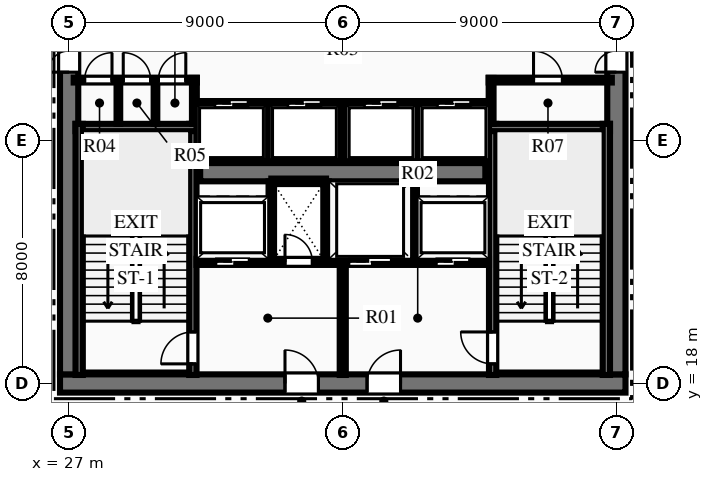
"""IFC4 building model, lengths in metres.
Left out: names, types, materials, properties, quantities, classifications, styles, units other than length and angle.
Written with IfcOpenShell. Run it as: python <this file> out.ifc"""

import sys

from ifc_helpers import new_model, si_unit, direction, frame, frame_2d, origin, place, context, subcontext, project, spatial, rectangle, extrude, element, fill, save


model = new_model("IFC4")
c1 = context("Model", 3, precision=1e-05, world=origin(), true_north=direction((0.0, 1.0)))
c2 = subcontext(c1, "Body", "Model", "MODEL_VIEW")
j1 = project(units=[si_unit("LENGTHUNIT", "METRE"), si_unit("PLANEANGLEUNIT", "RADIAN")], contexts=[c1])
p1 = place(None, origin())
s1 = spatial("IfcSite", under=j1, at=p1, CompositionType="ELEMENT")
p2 = place(p1, origin())
s2 = spatial("IfcBuilding", under=s1, at=p2, CompositionType="ELEMENT")
p3 = place(p2, frame((0.0, 0.0, 73.95)))
s3 = spatial("IfcBuildingStorey", under=s2, at=p3, CompositionType="ELEMENT", Elevation=73.95)
p4 = place(p3, frame((26.7, 18.0, 0.0), z_axis=(0.0, 0.0, 1.0), x_axis=(1.0, 0.0, 0.0)))
e1 = element("IfcWall", 1, at=p4, inside=s3, PredefinedType="SHEAR", context=c2, shape_type="SweptSolid", body=[
    extrude(rectangle(XDim=18.6, YDim=0.6, at=frame_2d((9.3, 0.0))), origin(), (0.0, 0.0, 1.0), 3.75),
])
p5 = place(p4, frame((7.4, 0.0, 0.0)))
e2 = element("IfcOpeningElement", 2, at=p5, cuts=e1, PredefinedType="OPENING", context=c2, shape_type="SweptSolid", body=[
    extrude(rectangle(XDim=1.1, YDim=2.15, at=frame_2d((0.55, 1.075))), frame((0.0, 0.31, 0.0), z_axis=(0.0, -1.0, 0.0), x_axis=(1.0, 0.0, 0.0)), (0.0, 0.0, 1.0), 0.62),
])
p6 = place(p4, frame((10.1, 0.0, 0.0)))
e3 = element("IfcOpeningElement", 3, at=p6, cuts=e1, PredefinedType="OPENING", context=c2, shape_type="SweptSolid", body=[
    extrude(rectangle(XDim=1.1, YDim=2.15, at=frame_2d((0.55, 1.075))), frame((0.0, 0.31, 0.0), z_axis=(0.0, -1.0, 0.0), x_axis=(1.0, 0.0, 0.0)), (0.0, 0.0, 1.0), 0.62),
])
p7 = place(p3, frame((27.0, 18.3, 0.0), z_axis=(0.0, 0.0, 1.0), x_axis=(0.0, 1.0, 0.0)))
e4 = element("IfcWall", 4, at=p7, inside=s3, PredefinedType="SHEAR", context=c2, shape_type="SweptSolid", body=[
    extrude(rectangle(XDim=15.4, YDim=0.6, at=frame_2d((7.7, 0.0))), origin(), (0.0, 0.0, 1.0), 3.75),
])
p8 = place(p7, frame((9.94, 0.0, 0.0)))
e5 = element("IfcOpeningElement", 5, at=p8, cuts=e4, PredefinedType="OPENING", context=c2, shape_type="SweptSolid", body=[
    extrude(rectangle(XDim=1.4, YDim=2.2, at=frame_2d((0.7, 1.1))), frame((0.0, 0.31, 0.0), z_axis=(0.0, -1.0, 0.0), x_axis=(1.0, 0.0, 0.0)), (0.0, 0.0, 1.0), 0.62),
])
p9 = place(p3, frame((45.0, 18.3, 0.0), z_axis=(0.0, 0.0, 1.0), x_axis=(0.0, 1.0, 0.0)))
e6 = element("IfcWall", 6, at=p9, inside=s3, PredefinedType="SHEAR", context=c2, shape_type="SweptSolid", body=[
    extrude(rectangle(XDim=15.4, YDim=0.6, at=frame_2d((7.7, 0.0))), origin(), (0.0, 0.0, 1.0), 3.75),
])
p10 = place(p9, frame((9.94, 0.0, 0.0)))
e7 = element("IfcOpeningElement", 7, at=p10, cuts=e6, PredefinedType="OPENING", context=c2, shape_type="SweptSolid", body=[
    extrude(rectangle(XDim=1.4, YDim=2.2, at=frame_2d((0.7, 1.1))), frame((0.0, 0.31, 0.0), z_axis=(0.0, -1.0, 0.0), x_axis=(1.0, 0.0, 0.0)), (0.0, 0.0, 1.0), 0.62),
])
p11 = place(p3, frame((31.31, 24.95, 0.0), z_axis=(0.0, 0.0, 1.0), x_axis=(1.0, 0.0, 0.0)))
e8 = element("IfcWall", 8, at=p11, inside=s3, PredefinedType="SHEAR", context=c2, shape_type="SweptSolid", body=[
    extrude(rectangle(XDim=9.38, YDim=0.6, at=frame_2d((4.69, 0.0))), origin(), (0.0, 0.0, 1.0), 3.75),
])
p12 = place(p3, frame((31.07, 18.28, 0.0), z_axis=(0.0, 0.0, 1.0), x_axis=(0.0, 1.0, 0.0)))
e9 = element("IfcWall", 9, at=p12, inside=s3, PredefinedType="SHEAR", context=c2, shape_type="SweptSolid", body=[
    extrude(rectangle(XDim=8.26, YDim=0.24, at=frame_2d((4.13, 0.0))), origin(), (0.0, 0.0, 1.0), 3.75),
])
p13 = place(p12, frame((0.365, 0.0, 0.0)))
e10 = element("IfcOpeningElement", 10, at=p13, cuts=e9, PredefinedType="OPENING", context=c2, shape_type="SweptSolid", body=[
    extrude(rectangle(XDim=1.05, YDim=2.15, at=frame_2d((0.525, 1.075))), frame((0.0, 0.13, 0.0), z_axis=(0.0, -1.0, 0.0), x_axis=(1.0, 0.0, 0.0)), (0.0, 0.0, 1.0), 0.26),
])
p14 = place(p3, frame((27.21, 26.42, 0.0), z_axis=(0.0, 0.0, 1.0), x_axis=(1.0, 0.0, 0.0)))
e11 = element("IfcWall", 11, at=p14, inside=s3, PredefinedType="SHEAR", context=c2, shape_type="SweptSolid", body=[
    extrude(rectangle(XDim=3.98, YDim=0.24, at=frame_2d((1.99, 0.0))), origin(), (0.0, 0.0, 1.0), 3.75),
])
p15 = place(p3, frame((27.33, 18.28, 0.0), z_axis=(0.0, 0.0, 1.0), x_axis=(0.0, 1.0, 0.0)))
e12 = element("IfcWall", 12, at=p15, inside=s3, PredefinedType="SHEAR", context=c2, shape_type="SweptSolid", body=[
    extrude(rectangle(XDim=8.26, YDim=0.24, at=frame_2d((4.13, 0.0))), origin(), (0.0, 0.0, 1.0), 3.75),
])
p16 = place(p3, frame((40.93, 18.28, 0.0), z_axis=(0.0, 0.0, 1.0), x_axis=(0.0, 1.0, 0.0)))
e13 = element("IfcWall", 13, at=p16, inside=s3, PredefinedType="SHEAR", context=c2, shape_type="SweptSolid", body=[
    extrude(rectangle(XDim=8.26, YDim=0.24, at=frame_2d((4.13, 0.0))), origin(), (0.0, 0.0, 1.0), 3.75),
])
p17 = place(p16, frame((0.365, 0.0, 0.0)))
e14 = element("IfcOpeningElement", 14, at=p17, cuts=e13, PredefinedType="OPENING", context=c2, shape_type="SweptSolid", body=[
    extrude(rectangle(XDim=1.05, YDim=2.15, at=frame_2d((0.525, 1.075))), frame((0.0, 0.13, 0.0), z_axis=(0.0, -1.0, 0.0), x_axis=(1.0, 0.0, 0.0)), (0.0, 0.0, 1.0), 0.26),
])
p18 = place(p3, frame((40.81, 26.42, 0.0), z_axis=(0.0, 0.0, 1.0), x_axis=(1.0, 0.0, 0.0)))
e15 = element("IfcWall", 15, at=p18, inside=s3, PredefinedType="SHEAR", context=c2, shape_type="SweptSolid", body=[
    extrude(rectangle(XDim=3.98, YDim=0.24, at=frame_2d((1.99, 0.0))), origin(), (0.0, 0.0, 1.0), 3.75),
])
p19 = place(p3, frame((44.67, 18.28, 0.0), z_axis=(0.0, 0.0, 1.0), x_axis=(0.0, 1.0, 0.0)))
e16 = element("IfcWall", 16, at=p19, inside=s3, PredefinedType="SHEAR", context=c2, shape_type="SweptSolid", body=[
    extrude(rectangle(XDim=8.26, YDim=0.24, at=frame_2d((4.13, 0.0))), origin(), (0.0, 0.0, 1.0), 3.75),
])
p20 = place(p3, frame((36.0, 18.28, 0.0), z_axis=(0.0, 0.0, 1.0), x_axis=(0.0, 1.0, 0.0)))
e17 = element("IfcWall", 17, at=p20, inside=s3, PredefinedType="PARTITIONING", context=c2, shape_type="SweptSolid", body=[
    extrude(rectangle(XDim=3.77, YDim=0.2, at=frame_2d((1.885, 0.0))), origin(), (0.0, 0.0, 1.0), 3.44),
])
p21 = place(p3, frame((31.19, 22.0, 0.0), z_axis=(0.0, 0.0, 1.0), x_axis=(1.0, 0.0, 0.0)))
e18 = element("IfcWall", 18, at=p21, inside=s3, PredefinedType="PARTITIONING", context=c2, shape_type="SweptSolid", body=[
    extrude(rectangle(XDim=4.69, YDim=0.2, at=frame_2d((2.345, 0.0))), origin(), (0.0, 0.0, 1.0), 3.44),
])
p22 = place(p21, frame((2.91, 0.0, 0.0)))
e19 = element("IfcOpeningElement", 19, at=p22, cuts=e18, PredefinedType="OPENING", context=c2, shape_type="SweptSolid", body=[
    extrude(rectangle(XDim=0.9, YDim=2.15, at=frame_2d((0.45, 1.075))), frame((0.0, 0.11, 0.0), z_axis=(0.0, -1.0, 0.0), x_axis=(1.0, 0.0, 0.0)), (0.0, 0.0, 1.0), 0.22),
])
p23 = place(p21, frame((0.635, 0.0, 0.0)))
e20 = element("IfcOpeningElement", 20, at=p23, cuts=e18, PredefinedType="OPENING", context=c2, shape_type="SweptSolid", body=[
    extrude(rectangle(XDim=1.1, YDim=2.15, at=frame_2d((0.55, 1.075))), frame((0.0, 0.11, 0.0), z_axis=(0.0, -1.0, 0.0), x_axis=(1.0, 0.0, 0.0)), (0.0, 0.0, 1.0), 0.22),
])
p24 = place(p3, frame((36.12, 22.0, 0.0), z_axis=(0.0, 0.0, 1.0), x_axis=(1.0, 0.0, 0.0)))
e21 = element("IfcWall", 21, at=p24, inside=s3, PredefinedType="PARTITIONING", context=c2, shape_type="SweptSolid", body=[
    extrude(rectangle(XDim=4.69, YDim=0.2, at=frame_2d((2.345, 0.0))), origin(), (0.0, 0.0, 1.0), 3.44),
])
p25 = place(p24, frame((2.955, 0.0, 0.0)))
e22 = element("IfcOpeningElement", 22, at=p25, cuts=e21, PredefinedType="OPENING", context=c2, shape_type="SweptSolid", body=[
    extrude(rectangle(XDim=1.1, YDim=2.15, at=frame_2d((0.55, 1.075))), frame((0.0, 0.11, 0.0), z_axis=(0.0, -1.0, 0.0), x_axis=(1.0, 0.0, 0.0)), (0.0, 0.0, 1.0), 0.22),
])
p26 = place(p24, frame((0.08, 0.0, 0.0)))
e23 = element("IfcOpeningElement", 23, at=p26, cuts=e21, PredefinedType="OPENING", context=c2, shape_type="SweptSolid", body=[
    extrude(rectangle(XDim=1.4, YDim=2.2, at=frame_2d((0.7, 1.1))), frame((0.0, 0.11, 0.0), z_axis=(0.0, -1.0, 0.0), x_axis=(1.0, 0.0, 0.0)), (0.0, 0.0, 1.0), 0.22),
])
for number, where, z_axis, x_axis in (
    (24, (33.65, 22.05, 0.0), (0.0, 0.0, 1.0), (0.0, 1.0, 0.0)),
    (25, (35.45, 22.05, 0.0), (0.0, 0.0, 1.0), (0.0, 1.0, 0.0)),
):
    element("IfcWall", number, at=place(p3, frame(where, z_axis=z_axis, x_axis=x_axis)), inside=s3, PredefinedType="PARTITIONING", context=c2, shape_type="SweptSolid", body=[
        extrude(rectangle(XDim=2.6, YDim=0.18, at=frame_2d((1.3, 0.0))), origin(), (0.0, 0.0, 1.0), 3.44),
    ])
p27 = place(p3, frame((33.65, 24.65, 0.0), z_axis=(0.0, 0.0, 1.0), x_axis=(1.0, 0.0, 0.0)))
e26 = element("IfcWall", 26, at=p27, inside=s3, PredefinedType="PARTITIONING", context=c2, shape_type="SweptSolid", body=[
    extrude(rectangle(XDim=1.8, YDim=0.18, at=frame_2d((0.9, 0.0))), origin(), (0.0, 0.0, 1.0), 3.44),
])
p28 = place(p3, frame((38.35, 22.05, 0.0), z_axis=(0.0, 0.0, 1.0), x_axis=(0.0, 1.0, 0.0)))
e27 = element("IfcWall", 27, at=p28, inside=s3, PredefinedType="PARTITIONING", context=c2, shape_type="SweptSolid", body=[
    extrude(rectangle(XDim=2.6, YDim=0.18, at=frame_2d((1.3, 0.0))), origin(), (0.0, 0.0, 1.0), 3.44),
])
p29 = place(p3, frame((27.15, 27.98, 0.0), z_axis=(0.0, 0.0, 1.0), x_axis=(1.0, 0.0, 0.0)))
e28 = element("IfcWall", 28, at=p29, inside=s3, PredefinedType="PARTITIONING", context=c2, shape_type="SweptSolid", body=[
    extrude(rectangle(XDim=4.05, YDim=0.16, at=frame_2d((2.025, 0.0))), origin(), (0.0, 0.0, 1.0), 3.44),
])
p30 = place(p29, frame((0.36, 0.0, 0.0)))
e29 = element("IfcOpeningElement", 29, at=p30, cuts=e28, PredefinedType="OPENING", context=c2, shape_type="SweptSolid", body=[
    extrude(rectangle(XDim=0.9, YDim=2.15, at=frame_2d((0.45, 1.075))), frame((0.0, 0.09, 0.0), z_axis=(0.0, -1.0, 0.0), x_axis=(1.0, 0.0, 0.0)), (0.0, 0.0, 1.0), 0.18),
])
p31 = place(p29, frame((1.63, 0.0, 0.0)))
e30 = element("IfcOpeningElement", 30, at=p31, cuts=e28, PredefinedType="OPENING", context=c2, shape_type="SweptSolid", body=[
    extrude(rectangle(XDim=0.9, YDim=2.15, at=frame_2d((0.45, 1.075))), frame((0.0, 0.09, 0.0), z_axis=(0.0, -1.0, 0.0), x_axis=(1.0, 0.0, 0.0)), (0.0, 0.0, 1.0), 0.18),
])
p32 = place(p29, frame((2.788, 0.0, 0.0)))
e31 = element("IfcOpeningElement", 31, at=p32, cuts=e28, PredefinedType="OPENING", context=c2, shape_type="SweptSolid", body=[
    extrude(rectangle(XDim=0.9, YDim=2.15, at=frame_2d((0.45, 1.075))), frame((0.0, 0.09, 0.0), z_axis=(0.0, -1.0, 0.0), x_axis=(1.0, 0.0, 0.0)), (0.0, 0.0, 1.0), 0.18),
])
p33 = place(p3, frame((31.12, 26.54, 0.0), z_axis=(0.0, 0.0, 1.0), x_axis=(0.0, 1.0, 0.0)))
e32 = element("IfcWall", 32, at=p33, inside=s3, PredefinedType="PARTITIONING", context=c2, shape_type="SweptSolid", body=[
    extrude(rectangle(XDim=1.51, YDim=0.16, at=frame_2d((0.755, 0.0))), origin(), (0.0, 0.0, 1.0), 3.44),
])
p34 = place(p3, frame((40.8, 27.98, 0.0), z_axis=(0.0, 0.0, 1.0), x_axis=(1.0, 0.0, 0.0)))
e33 = element("IfcWall", 33, at=p34, inside=s3, PredefinedType="PARTITIONING", context=c2, shape_type="SweptSolid", body=[
    extrude(rectangle(XDim=4.05, YDim=0.16, at=frame_2d((2.025, 0.0))), origin(), (0.0, 0.0, 1.0), 3.44),
])
p35 = place(p34, frame((1.475, 0.0, 0.0)))
e34 = element("IfcOpeningElement", 34, at=p35, cuts=e33, PredefinedType="OPENING", context=c2, shape_type="SweptSolid", body=[
    extrude(rectangle(XDim=0.95, YDim=2.15, at=frame_2d((0.475, 1.075))), frame((0.0, 0.09, 0.0), z_axis=(0.0, -1.0, 0.0), x_axis=(1.0, 0.0, 0.0)), (0.0, 0.0, 1.0), 0.18),
])
p36 = place(p3, frame((40.88, 26.54, 0.0), z_axis=(0.0, 0.0, 1.0), x_axis=(0.0, 1.0, 0.0)))
e35 = element("IfcWall", 35, at=p36, inside=s3, PredefinedType="PARTITIONING", context=c2, shape_type="SweptSolid", body=[
    extrude(rectangle(XDim=1.51, YDim=0.16, at=frame_2d((0.755, 0.0))), origin(), (0.0, 0.0, 1.0), 3.44),
])
for number, where, z_axis, x_axis in (
    (36, (28.62, 26.54, 0.0), (0.0, 0.0, 1.0), (0.0, 1.0, 0.0)),
    (37, (29.84, 26.54, 0.0), (0.0, 0.0, 1.0), (0.0, 1.0, 0.0)),
):
    element("IfcWall", number, at=place(p3, frame(where, z_axis=z_axis, x_axis=x_axis)), inside=s3, PredefinedType="PARTITIONING", context=c2, shape_type="SweptSolid", body=[
        extrude(rectangle(XDim=1.44, YDim=0.12, at=frame_2d((0.72, 0.0))), origin(), (0.0, 0.0, 1.0), 3.44),
    ])
p37 = place(p3, frame((31.2, 27.2, 0.0), z_axis=(0.0, 0.0, 1.0), x_axis=(1.0, 0.0, 0.0)))
e38 = element("IfcWall", 38, at=p37, inside=s3, PredefinedType="PARTITIONING", context=c2, shape_type="SweptSolid", body=[
    extrude(rectangle(XDim=9.6, YDim=0.18, at=frame_2d((4.8, 0.0))), origin(), (0.0, 0.0, 1.0), 3.44),
])
p38 = place(p37, frame((0.59, 0.0, 0.0)))
e39 = element("IfcOpeningElement", 39, at=p38, cuts=e38, PredefinedType="OPENING", context=c2, shape_type="SweptSolid", body=[
    extrude(rectangle(XDim=1.1, YDim=2.15, at=frame_2d((0.55, 1.075))), frame((0.0, 0.1, 0.0), z_axis=(0.0, -1.0, 0.0), x_axis=(1.0, 0.0, 0.0)), (0.0, 0.0, 1.0), 0.2),
])
p39 = place(p37, frame((2.99, 0.0, 0.0)))
e40 = element("IfcOpeningElement", 40, at=p39, cuts=e38, PredefinedType="OPENING", context=c2, shape_type="SweptSolid", body=[
    extrude(rectangle(XDim=1.1, YDim=2.15, at=frame_2d((0.55, 1.075))), frame((0.0, 0.1, 0.0), z_axis=(0.0, -1.0, 0.0), x_axis=(1.0, 0.0, 0.0)), (0.0, 0.0, 1.0), 0.2),
])
p40 = place(p37, frame((5.51, 0.0, 0.0)))
e41 = element("IfcOpeningElement", 41, at=p40, cuts=e38, PredefinedType="OPENING", context=c2, shape_type="SweptSolid", body=[
    extrude(rectangle(XDim=1.1, YDim=2.15, at=frame_2d((0.55, 1.075))), frame((0.0, 0.1, 0.0), z_axis=(0.0, -1.0, 0.0), x_axis=(1.0, 0.0, 0.0)), (0.0, 0.0, 1.0), 0.2),
])
p41 = place(p37, frame((7.91, 0.0, 0.0)))
e42 = element("IfcOpeningElement", 42, at=p41, cuts=e38, PredefinedType="OPENING", context=c2, shape_type="SweptSolid", body=[
    extrude(rectangle(XDim=1.1, YDim=2.15, at=frame_2d((0.55, 1.075))), frame((0.0, 0.1, 0.0), z_axis=(0.0, -1.0, 0.0), x_axis=(1.0, 0.0, 0.0)), (0.0, 0.0, 1.0), 0.2),
])
for number, where, z_axis, x_axis in (
    (43, (33.54, 25.3, 0.0), (0.0, 0.0, 1.0), (0.0, 1.0, 0.0)),
    (44, (36.0, 25.3, 0.0), (0.0, 0.0, 1.0), (0.0, 1.0, 0.0)),
    (45, (38.46, 25.3, 0.0), (0.0, 0.0, 1.0), (0.0, 1.0, 0.0)),
):
    element("IfcWall", number, at=place(p3, frame(where, z_axis=z_axis, x_axis=x_axis)), inside=s3, PredefinedType="PARTITIONING", context=c2, shape_type="SweptSolid", body=[
        extrude(rectangle(XDim=1.9, YDim=0.18, at=frame_2d((0.95, 0.0))), origin(), (0.0, 0.0, 1.0), 3.44),
    ])
p42 = place(p30, origin())
e46 = element("IfcDoor", 46, at=p42, inside=s3, OperationType="SINGLE_SWING_RIGHT", PredefinedType="DOOR", context=c2, shape_type="SweptSolid", body=[
    extrude(rectangle(XDim=0.9, YDim=2.15, at=frame_2d((0.45, 1.075))), frame((0.0, 0.025, 0.0), z_axis=(0.0, -1.0, 0.0), x_axis=(1.0, 0.0, 0.0)), (0.0, 0.0, 1.0), 0.05),
])
fill(e29, e46)
p43 = place(p31, origin())
e47 = element("IfcDoor", 47, at=p43, inside=s3, OperationType="SINGLE_SWING_LEFT", PredefinedType="DOOR", context=c2, shape_type="SweptSolid", body=[
    extrude(rectangle(XDim=0.9, YDim=2.15, at=frame_2d((0.45, 1.075))), frame((0.0, 0.025, 0.0), z_axis=(0.0, -1.0, 0.0), x_axis=(1.0, 0.0, 0.0)), (0.0, 0.0, 1.0), 0.05),
])
fill(e30, e47)
p44 = place(p32, origin())
e48 = element("IfcDoor", 48, at=p44, inside=s3, OperationType="SINGLE_SWING_RIGHT", PredefinedType="DOOR", context=c2, shape_type="SweptSolid", body=[
    extrude(rectangle(XDim=0.9, YDim=2.15, at=frame_2d((0.45, 1.075))), frame((0.0, 0.025, 0.0), z_axis=(0.0, -1.0, 0.0), x_axis=(1.0, 0.0, 0.0)), (0.0, 0.0, 1.0), 0.05),
])
fill(e31, e48)
p45 = place(p35, origin())
e49 = element("IfcDoor", 49, at=p45, inside=s3, OperationType="SINGLE_SWING_LEFT", PredefinedType="DOOR", context=c2, shape_type="SweptSolid", body=[
    extrude(rectangle(XDim=0.95, YDim=2.15, at=frame_2d((0.475, 1.075))), frame((0.0, 0.025, 0.0), z_axis=(0.0, -1.0, 0.0), x_axis=(1.0, 0.0, 0.0)), (0.0, 0.0, 1.0), 0.05),
])
fill(e34, e49)
p46 = place(p13, origin())
e50 = element("IfcDoor", 50, at=p46, inside=s3, OperationType="SINGLE_SWING_LEFT", PredefinedType="DOOR", context=c2, shape_type="SweptSolid", body=[
    extrude(rectangle(XDim=1.05, YDim=2.15, at=frame_2d((0.525, 1.075))), frame((0.0, 0.025, 0.0), z_axis=(0.0, -1.0, 0.0), x_axis=(1.0, 0.0, 0.0)), (0.0, 0.0, 1.0), 0.05),
])
fill(e10, e50)
p47 = place(p17, origin())
e51 = element("IfcDoor", 51, at=p47, inside=s3, OperationType="SINGLE_SWING_RIGHT", PredefinedType="DOOR", context=c2, shape_type="SweptSolid", body=[
    extrude(rectangle(XDim=1.05, YDim=2.15, at=frame_2d((0.525, 1.075))), frame((0.0, 0.025, 0.0), z_axis=(0.0, -1.0, 0.0), x_axis=(1.0, 0.0, 0.0)), (0.0, 0.0, 1.0), 0.05),
])
fill(e14, e51)
p48 = place(p5, origin())
e52 = element("IfcDoor", 52, at=p48, inside=s3, OperationType="SINGLE_SWING_LEFT", PredefinedType="DOOR", context=c2, shape_type="SweptSolid", body=[
    extrude(rectangle(XDim=1.1, YDim=2.15, at=frame_2d((0.55, 1.075))), frame((0.0, 0.025, 0.0), z_axis=(0.0, -1.0, 0.0), x_axis=(1.0, 0.0, 0.0)), (0.0, 0.0, 1.0), 0.05),
])
fill(e2, e52)
p49 = place(p6, origin())
e53 = element("IfcDoor", 53, at=p49, inside=s3, OperationType="SINGLE_SWING_RIGHT", PredefinedType="DOOR", context=c2, shape_type="SweptSolid", body=[
    extrude(rectangle(XDim=1.1, YDim=2.15, at=frame_2d((0.55, 1.075))), frame((0.0, 0.025, 0.0), z_axis=(0.0, -1.0, 0.0), x_axis=(1.0, 0.0, 0.0)), (0.0, 0.0, 1.0), 0.05),
])
fill(e3, e53)
p50 = place(p22, origin())
e54 = element("IfcDoor", 54, at=p50, inside=s3, OperationType="SINGLE_SWING_LEFT", PredefinedType="DOOR", context=c2, shape_type="SweptSolid", body=[
    extrude(rectangle(XDim=0.9, YDim=2.15, at=frame_2d((0.45, 1.075))), frame((0.0, 0.025, 0.0), z_axis=(0.0, -1.0, 0.0), x_axis=(1.0, 0.0, 0.0)), (0.0, 0.0, 1.0), 0.05),
])
fill(e19, e54)
p51 = place(p8, origin())
e55 = element("IfcDoor", 55, at=p51, inside=s3, OperationType="DOUBLE_DOOR_SINGLE_SWING", PredefinedType="DOOR", context=c2, shape_type="SweptSolid", body=[
    extrude(rectangle(XDim=1.4, YDim=2.2, at=frame_2d((0.7, 1.1))), frame((0.0, 0.025, 0.0), z_axis=(0.0, -1.0, 0.0), x_axis=(1.0, 0.0, 0.0)), (0.0, 0.0, 1.0), 0.05),
])
fill(e5, e55)
p52 = place(p10, origin())
e56 = element("IfcDoor", 56, at=p52, inside=s3, OperationType="DOUBLE_DOOR_SINGLE_SWING", PredefinedType="DOOR", context=c2, shape_type="SweptSolid", body=[
    extrude(rectangle(XDim=1.4, YDim=2.2, at=frame_2d((0.7, 1.1))), frame((0.0, 0.025, 0.0), z_axis=(0.0, -1.0, 0.0), x_axis=(1.0, 0.0, 0.0)), (0.0, 0.0, 1.0), 0.05),
])
fill(e7, e56)
p53 = place(p38, origin())
e57 = element("IfcDoor", 57, at=p53, inside=s3, OperationType="SLIDING_TO_LEFT", PredefinedType="DOOR", context=c2, shape_type="SweptSolid", body=[
    extrude(rectangle(XDim=1.1, YDim=2.15, at=frame_2d((0.55, 1.075))), frame((0.0, 0.025, 0.0), z_axis=(0.0, -1.0, 0.0), x_axis=(1.0, 0.0, 0.0)), (0.0, 0.0, 1.0), 0.05),
])
fill(e39, e57)
p54 = place(p39, origin())
e58 = element("IfcDoor", 58, at=p54, inside=s3, OperationType="SLIDING_TO_LEFT", PredefinedType="DOOR", context=c2, shape_type="SweptSolid", body=[
    extrude(rectangle(XDim=1.1, YDim=2.15, at=frame_2d((0.55, 1.075))), frame((0.0, 0.025, 0.0), z_axis=(0.0, -1.0, 0.0), x_axis=(1.0, 0.0, 0.0)), (0.0, 0.0, 1.0), 0.05),
])
fill(e40, e58)
p55 = place(p40, origin())
e59 = element("IfcDoor", 59, at=p55, inside=s3, OperationType="SLIDING_TO_LEFT", PredefinedType="DOOR", context=c2, shape_type="SweptSolid", body=[
    extrude(rectangle(XDim=1.1, YDim=2.15, at=frame_2d((0.55, 1.075))), frame((0.0, 0.025, 0.0), z_axis=(0.0, -1.0, 0.0), x_axis=(1.0, 0.0, 0.0)), (0.0, 0.0, 1.0), 0.05),
])
fill(e41, e59)
p56 = place(p41, origin())
e60 = element("IfcDoor", 60, at=p56, inside=s3, OperationType="SLIDING_TO_LEFT", PredefinedType="DOOR", context=c2, shape_type="SweptSolid", body=[
    extrude(rectangle(XDim=1.1, YDim=2.15, at=frame_2d((0.55, 1.075))), frame((0.0, 0.025, 0.0), z_axis=(0.0, -1.0, 0.0), x_axis=(1.0, 0.0, 0.0)), (0.0, 0.0, 1.0), 0.05),
])
fill(e42, e60)
p57 = place(p23, origin())
e61 = element("IfcDoor", 61, at=p57, inside=s3, OperationType="SLIDING_TO_LEFT", PredefinedType="DOOR", context=c2, shape_type="SweptSolid", body=[
    extrude(rectangle(XDim=1.1, YDim=2.15, at=frame_2d((0.55, 1.075))), frame((0.0, 0.025, 0.0), z_axis=(0.0, -1.0, 0.0), x_axis=(1.0, 0.0, 0.0)), (0.0, 0.0, 1.0), 0.05),
])
fill(e20, e61)
p58 = place(p25, origin())
e62 = element("IfcDoor", 62, at=p58, inside=s3, OperationType="SLIDING_TO_LEFT", PredefinedType="DOOR", context=c2, shape_type="SweptSolid", body=[
    extrude(rectangle(XDim=1.1, YDim=2.15, at=frame_2d((0.55, 1.075))), frame((0.0, 0.025, 0.0), z_axis=(0.0, -1.0, 0.0), x_axis=(1.0, 0.0, 0.0)), (0.0, 0.0, 1.0), 0.05),
])
fill(e22, e62)
p59 = place(p26, origin())
e63 = element("IfcDoor", 63, at=p59, inside=s3, OperationType="SLIDING_TO_LEFT", PredefinedType="DOOR", context=c2, shape_type="SweptSolid", body=[
    extrude(rectangle(XDim=1.4, YDim=2.2, at=frame_2d((0.7, 1.1))), frame((0.0, 0.025, 0.0), z_axis=(0.0, -1.0, 0.0), x_axis=(1.0, 0.0, 0.0)), (0.0, 0.0, 1.0), 0.05),
])
fill(e23, e63)
save(model, sys.argv[1])
